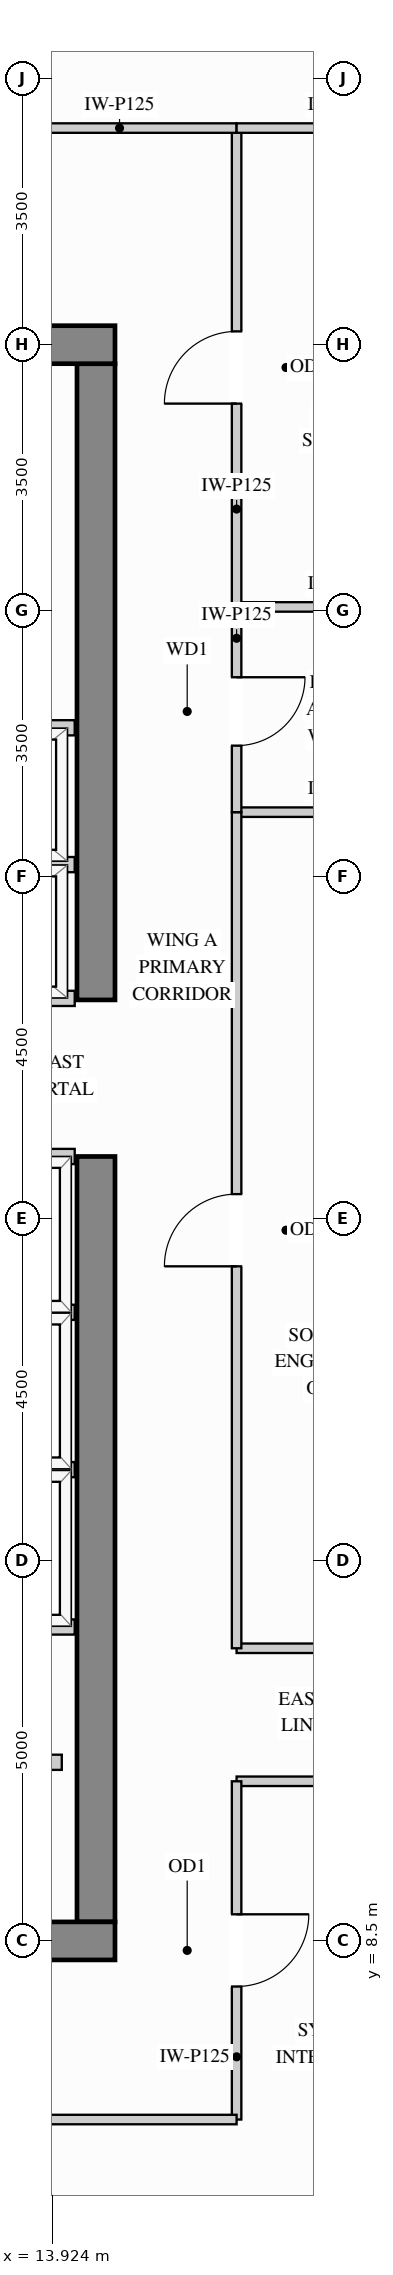
"""IFC4 building model, lengths in metres.
Left out: names, types, materials, properties, quantities, classifications, styles, units other than length and angle.
Written with IfcOpenShell. Run it as: python <this file> out.ifc"""

import sys

from ifc_helpers import new_model, si_unit, direction, frame, frame_2d, origin, place, context, subcontext, project, spatial, rectangle, extrude, source, transform, mapped, element, fill, save


model = new_model("IFC4")
c1 = context("Model", 3, precision=1e-05, world=origin(), true_north=direction((0.0, 1.0)))
c2 = subcontext(c1, "Body", "Model", "MODEL_VIEW")
j1 = project(units=[si_unit("LENGTHUNIT", "METRE"), si_unit("PLANEANGLEUNIT", "RADIAN")], contexts=[c1])
p1 = place(None, origin())
s1 = spatial("IfcSite", under=j1, at=p1, CompositionType="ELEMENT")
p2 = place(p1, origin())
s2 = spatial("IfcBuilding", under=s1, at=p2, CompositionType="ELEMENT")
p3 = place(p2, frame((0.0, 0.0, 266.4)))
s3 = spatial("IfcBuildingStorey", under=s2, at=p3, CompositionType="ELEMENT", Elevation=266.4)
m1 = source(origin(), c2, "Body", "SweptSolid", [
    extrude(rectangle(XDim=10.07, YDim=0.5, at=frame_2d((5.035, 0.0))), origin(), (0.0, 0.0, 1.0), 3.4),
])
p4 = place(p3, frame((14.5, 8.75, 0.0), z_axis=(0.0, 0.0, 1.0), x_axis=(0.0, 1.0, 0.0)))
e1 = element("IfcWall", 1, at=p4, inside=s3, PredefinedType="SHEAR", context=c2, shape_type="MappedRepresentation", body=[
    mapped(m1, transform((0.0, 0.0, 0.0), x_axis=(1.0, 0.0, 0.0), y_axis=(0.0, 1.0, 0.0), z_axis=(0.0, 0.0, 1.0))),
])
m2 = source(origin(), c2, "Body", "SweptSolid", [
    extrude(rectangle(XDim=8.37, YDim=0.5, at=frame_2d((4.185, 0.0))), origin(), (0.0, 0.0, 1.0), 3.4),
])
p5 = place(p3, frame((14.5, 20.88, 0.0), z_axis=(0.0, 0.0, 1.0), x_axis=(0.0, 1.0, 0.0)))
e2 = element("IfcWall", 2, at=p5, inside=s3, PredefinedType="SHEAR", context=c2, shape_type="MappedRepresentation", body=[
    mapped(m2, transform((0.0, 0.0, 0.0), x_axis=(1.0, 0.0, 0.0), y_axis=(0.0, 1.0, 0.0), z_axis=(0.0, 0.0, 1.0))),
])
m3 = source(origin(), c2, "Body", "SweptSolid", [
    extrude(rectangle(XDim=10.5, YDim=0.5, at=frame_2d((5.25, 0.0))), origin(), (0.0, 0.0, 1.0), 3.4),
])
for number, where, z_axis, x_axis in (
    (3, (4.25, 29.5, 0.0), (0.0, 0.0, 1.0), (1.0, 0.0, 0.0)),
    (4, (4.25, 8.5, 0.0), (0.0, 0.0, 1.0), (1.0, 0.0, 0.0)),
):
    element("IfcWall", number, at=place(p3, frame(where, z_axis=z_axis, x_axis=x_axis)), inside=s3, PredefinedType="SHEAR", context=c2, shape_type="MappedRepresentation", body=[
        mapped(m3, transform((0.0, 0.0, 0.0), x_axis=(1.0, 0.0, 0.0), y_axis=(0.0, 1.0, 0.0), z_axis=(0.0, 0.0, 1.0))),
    ])
m4 = source(origin(), c2, "Body", "SweptSolid", [
    extrude(rectangle(XDim=2.798, YDim=0.125, at=frame_2d((1.399, 0.0))), origin(), (0.0, 0.0, 1.0), 3.385),
])
for number, where, z_axis, x_axis in (
    (5, (16.35, 23.35, 0.0), (0.0, 0.0, 1.0), (1.0, 0.0, 0.0)),
    (6, (16.35, 26.05, 0.0), (0.0, 0.0, 1.0), (1.0, 0.0, 0.0)),
):
    element("IfcWall", number, at=place(p3, frame(where, z_axis=z_axis, x_axis=x_axis)), inside=s3, PredefinedType="PARTITIONING", context=c2, shape_type="MappedRepresentation", body=[
        mapped(m4, transform((0.0, 0.0, 0.0), x_axis=(1.0, 0.0, 0.0), y_axis=(0.0, 1.0, 0.0), z_axis=(0.0, 0.0, 1.0))),
    ])
m5 = source(origin(), c2, "Body", "SweptSolid", [
    extrude(rectangle(XDim=3.15, YDim=0.125, at=frame_2d((1.575, 0.0))), origin(), (0.0, 0.0, 1.0), 3.385),
])
for number, where, z_axis, x_axis in (
    (7, (16.35, 12.35, 0.0), (0.0, 0.0, 1.0), (1.0, 0.0, 0.0)),
    (8, (16.35, 10.6, 0.0), (0.0, 0.0, 1.0), (1.0, 0.0, 0.0)),
):
    element("IfcWall", number, at=place(p3, frame(where, z_axis=z_axis, x_axis=x_axis)), inside=s3, PredefinedType="PARTITIONING", context=c2, shape_type="MappedRepresentation", body=[
        mapped(m5, transform((0.0, 0.0, 0.0), x_axis=(1.0, 0.0, 0.0), y_axis=(0.0, 1.0, 0.0), z_axis=(0.0, 0.0, 1.0))),
    ])
p6 = place(p3, frame((16.35, 6.15, 0.0), z_axis=(0.0, 0.0, 1.0), x_axis=(0.0, 1.0, 0.0)))
e9 = element("IfcWall", 9, at=p6, inside=s3, PredefinedType="PARTITIONING", context=c2, shape_type="SweptSolid", body=[
    extrude(rectangle(XDim=4.45, YDim=0.125, at=frame_2d((2.225, 0.0))), origin(), (0.0, 0.0, 1.0), 3.385),
])
p7 = place(p6, frame((1.75, 0.0, 0.0)))
e10 = element("IfcOpeningElement", 10, at=p7, cuts=e9, PredefinedType="OPENING", context=c2, shape_type="SweptSolid", body=[
    extrude(rectangle(XDim=0.95, YDim=2.15, at=frame_2d((0.475, 1.075))), frame((0.0, 0.073, 0.0), z_axis=(0.0, -1.0, 0.0), x_axis=(1.0, 0.0, 0.0)), (0.0, 0.0, 1.0), 0.145),
])
p8 = place(p3, frame((16.35, 12.35, 0.0), z_axis=(0.0, 0.0, 1.0), x_axis=(0.0, 1.0, 0.0)))
e11 = element("IfcWall", 11, at=p8, inside=s3, PredefinedType="PARTITIONING", context=c2, shape_type="SweptSolid", body=[
    extrude(rectangle(XDim=11.0, YDim=0.125, at=frame_2d((5.5, 0.0))), origin(), (0.0, 0.0, 1.0), 3.385),
])
p9 = place(p8, frame((5.025, 0.0, 0.0)))
e12 = element("IfcOpeningElement", 12, at=p9, cuts=e11, PredefinedType="OPENING", context=c2, shape_type="SweptSolid", body=[
    extrude(rectangle(XDim=0.95, YDim=2.15, at=frame_2d((0.475, 1.075))), frame((0.0, 0.073, 0.0), z_axis=(0.0, -1.0, 0.0), x_axis=(1.0, 0.0, 0.0)), (0.0, 0.0, 1.0), 0.145),
])
p10 = place(p3, frame((16.35, 26.05, 0.0), z_axis=(0.0, 0.0, 1.0), x_axis=(0.0, 1.0, 0.0)))
e13 = element("IfcWall", 13, at=p10, inside=s3, PredefinedType="PARTITIONING", context=c2, shape_type="SweptSolid", body=[
    extrude(rectangle(XDim=6.3, YDim=0.125, at=frame_2d((3.15, 0.0))), origin(), (0.0, 0.0, 1.0), 3.385),
])
p11 = place(p10, frame((2.675, 0.0, 0.0)))
e14 = element("IfcOpeningElement", 14, at=p11, cuts=e13, PredefinedType="OPENING", context=c2, shape_type="SweptSolid", body=[
    extrude(rectangle(XDim=0.95, YDim=2.15, at=frame_2d((0.475, 1.075))), frame((0.0, 0.073, 0.0), z_axis=(0.0, -1.0, 0.0), x_axis=(1.0, 0.0, 0.0)), (0.0, 0.0, 1.0), 0.145),
])
p12 = place(p3, frame((16.35, 23.35, 0.0), z_axis=(0.0, 0.0, 1.0), x_axis=(0.0, 1.0, 0.0)))
e15 = element("IfcWall", 15, at=p12, inside=s3, PredefinedType="PARTITIONING", context=c2, shape_type="SweptSolid", body=[
    extrude(rectangle(XDim=2.7, YDim=0.125, at=frame_2d((1.35, 0.0))), origin(), (0.0, 0.0, 1.0), 3.385),
])
p13 = place(p12, frame((0.875, 0.0, 0.0)))
e16 = element("IfcOpeningElement", 16, at=p13, cuts=e15, PredefinedType="OPENING", context=c2, shape_type="SweptSolid", body=[
    extrude(rectangle(XDim=0.9, YDim=2.15, at=frame_2d((0.45, 1.075))), frame((0.0, 0.073, 0.0), z_axis=(0.0, -1.0, 0.0), x_axis=(1.0, 0.0, 0.0)), (0.0, 0.0, 1.0), 0.145),
])
p14 = place(p3, frame((9.039, 32.35, 0.0), z_axis=(0.0, 0.0, 1.0), x_axis=(1.0, 0.0, 0.0)))
e17 = element("IfcWall", 17, at=p14, inside=s3, PredefinedType="PARTITIONING", context=c2, shape_type="SweptSolid", body=[
    extrude(rectangle(XDim=7.311, YDim=0.125, at=frame_2d((3.656, 0.0))), origin(), (0.0, 0.0, 1.0), 3.385),
])
p15 = place(p14, frame((3.18, 0.0, 0.0)))
e18 = element("IfcOpeningElement", 18, at=p15, cuts=e17, PredefinedType="OPENING", context=c2, shape_type="SweptSolid", body=[
    extrude(rectangle(XDim=0.95, YDim=2.15, at=frame_2d((0.475, 1.075))), frame((0.0, 0.073, 0.0), z_axis=(0.0, -1.0, 0.0), x_axis=(1.0, 0.0, 0.0)), (0.0, 0.0, 1.0), 0.145),
])
p16 = place(p3, frame((16.35, 32.35, 0.0), z_axis=(0.0, 0.0, 1.0), x_axis=(1.0, 0.0, 0.0)))
e19 = element("IfcWall", 19, at=p16, inside=s3, PredefinedType="PARTITIONING", context=c2, shape_type="MappedRepresentation", body=[
    mapped(m4, transform((0.0, 0.0, 0.0), x_axis=(1.0, 0.0, 0.0), y_axis=(0.0, 1.0, 0.0), z_axis=(0.0, 0.0, 1.0))),
])
p17 = place(p3, frame((10.179, 6.15, 0.0), z_axis=(0.0, 0.0, 1.0), x_axis=(1.0, 0.0, 0.0)))
e20 = element("IfcWall", 20, at=p17, inside=s3, PredefinedType="PARTITIONING", context=c2, shape_type="SweptSolid", body=[
    extrude(rectangle(XDim=6.171, YDim=0.125, at=frame_2d((3.085, 0.0))), origin(), (0.0, 0.0, 1.0), 3.385),
])
p18 = place(p17, frame((2.611, 0.0, 0.0)))
e21 = element("IfcOpeningElement", 21, at=p18, cuts=e20, PredefinedType="OPENING", context=c2, shape_type="SweptSolid", body=[
    extrude(rectangle(XDim=0.95, YDim=2.15, at=frame_2d((0.475, 1.075))), frame((0.0, 0.073, 0.0), z_axis=(0.0, -1.0, 0.0), x_axis=(1.0, 0.0, 0.0)), (0.0, 0.0, 1.0), 0.145),
])
m6 = source(origin(), c2, "Body", "SweptSolid", [
    extrude(rectangle(XDim=1.63, YDim=0.2, at=frame_2d((0.815, 0.0))), origin(), (0.0, 0.0, 1.0), 3.385),
])
p19 = place(p3, frame((12.42, 10.85, 0.0), z_axis=(0.0, 0.0, 1.0), x_axis=(1.0, 0.0, 0.0)))
e22 = element("IfcWall", 22, at=p19, inside=s3, PredefinedType="PARTITIONING", context=c2, shape_type="MappedRepresentation", body=[
    mapped(m6, transform((0.0, 0.0, 0.0), x_axis=(1.0, 0.0, 0.0), y_axis=(0.0, 1.0, 0.0), z_axis=(0.0, 0.0, 1.0))),
])
m7 = source(origin(), c2, "Body", "SweptSolid", [
    extrude(rectangle(XDim=2.39, YDim=0.2, at=frame_2d((1.195, 0.0))), origin(), (0.0, 0.0, 1.0), 3.385),
])
for number, where, z_axis, x_axis in (
    (23, (11.83, 22.66, 0.0), (0.0, 0.0, 1.0), (1.0, 0.0, 0.0)),
    (24, (11.83, 20.9, 0.0), (0.0, 0.0, 1.0), (1.0, 0.0, 0.0)),
    (25, (11.83, 24.46, 0.0), (0.0, 0.0, 1.0), (1.0, 0.0, 0.0)),
):
    element("IfcWall", number, at=place(p3, frame(where, z_axis=z_axis, x_axis=x_axis)), inside=s3, PredefinedType="PARTITIONING", context=c2, shape_type="MappedRepresentation", body=[
        mapped(m7, transform((0.0, 0.0, 0.0), x_axis=(1.0, 0.0, 0.0), y_axis=(0.0, 1.0, 0.0), z_axis=(0.0, 0.0, 1.0))),
    ])
m8 = source(origin(), c2, "Body", "SweptSolid", [
    extrude(rectangle(XDim=1.99, YDim=0.2, at=frame_2d((0.995, 0.0))), origin(), (0.0, 0.0, 1.0), 3.385),
])
for number, where, z_axis, x_axis in (
    (26, (12.23, 14.7, 0.0), (0.0, 0.0, 1.0), (1.0, 0.0, 0.0)),
    (27, (12.23, 12.63, 0.0), (0.0, 0.0, 1.0), (1.0, 0.0, 0.0)),
    (28, (12.23, 16.77, 0.0), (0.0, 0.0, 1.0), (1.0, 0.0, 0.0)),
    (29, (12.23, 18.82, 0.0), (0.0, 0.0, 1.0), (1.0, 0.0, 0.0)),
):
    element("IfcWall", number, at=place(p3, frame(where, z_axis=z_axis, x_axis=x_axis)), inside=s3, PredefinedType="PARTITIONING", context=c2, shape_type="MappedRepresentation", body=[
        mapped(m8, transform((0.0, 0.0, 0.0), x_axis=(1.0, 0.0, 0.0), y_axis=(0.0, 1.0, 0.0), z_axis=(0.0, 0.0, 1.0))),
    ])
m9 = source(origin(), c2, "Body", "SweptSolid", [
    extrude(rectangle(XDim=0.95, YDim=2.15, at=frame_2d((0.475, 1.075))), frame((0.0, 0.025, 0.0), z_axis=(0.0, -1.0, 0.0), x_axis=(1.0, 0.0, 0.0)), (0.0, 0.0, 1.0), 0.05),
])
p20 = place(p7, origin())
e30 = element("IfcDoor", 30, at=p20, inside=s3, OperationType="SINGLE_SWING_RIGHT", PredefinedType="DOOR", context=c2, shape_type="MappedRepresentation", body=[
    mapped(m9, transform((0.0, 0.0, 0.0), x_axis=(1.0, 0.0, 0.0), y_axis=(0.0, 1.0, 0.0), z_axis=(0.0, 0.0, 1.0))),
])
fill(e10, e30)
p21 = place(p9, origin())
e31 = element("IfcDoor", 31, at=p21, inside=s3, OperationType="SINGLE_SWING_LEFT", PredefinedType="DOOR", context=c2, shape_type="MappedRepresentation", body=[
    mapped(m9, transform((0.0, 0.0, 0.0), x_axis=(1.0, 0.0, 0.0), y_axis=(0.0, 1.0, 0.0), z_axis=(0.0, 0.0, 1.0))),
])
fill(e12, e31)
p22 = place(p11, origin())
e32 = element("IfcDoor", 32, at=p22, inside=s3, OperationType="SINGLE_SWING_LEFT", PredefinedType="DOOR", context=c2, shape_type="MappedRepresentation", body=[
    mapped(m9, transform((0.0, 0.0, 0.0), x_axis=(1.0, 0.0, 0.0), y_axis=(0.0, 1.0, 0.0), z_axis=(0.0, 0.0, 1.0))),
])
fill(e14, e32)
m10 = source(origin(), c2, "Body", "SweptSolid", [
    extrude(rectangle(XDim=0.9, YDim=2.15, at=frame_2d((0.45, 1.075))), frame((0.0, 0.025, 0.0), z_axis=(0.0, -1.0, 0.0), x_axis=(1.0, 0.0, 0.0)), (0.0, 0.0, 1.0), 0.05),
])
p23 = place(p13, origin())
e33 = element("IfcDoor", 33, at=p23, inside=s3, OperationType="SINGLE_SWING_RIGHT", PredefinedType="DOOR", context=c2, shape_type="MappedRepresentation", body=[
    mapped(m10, transform((0.0, 0.0, 0.0), x_axis=(1.0, 0.0, 0.0), y_axis=(0.0, 1.0, 0.0), z_axis=(0.0, 0.0, 1.0))),
])
fill(e16, e33)
save(model, sys.argv[1])
